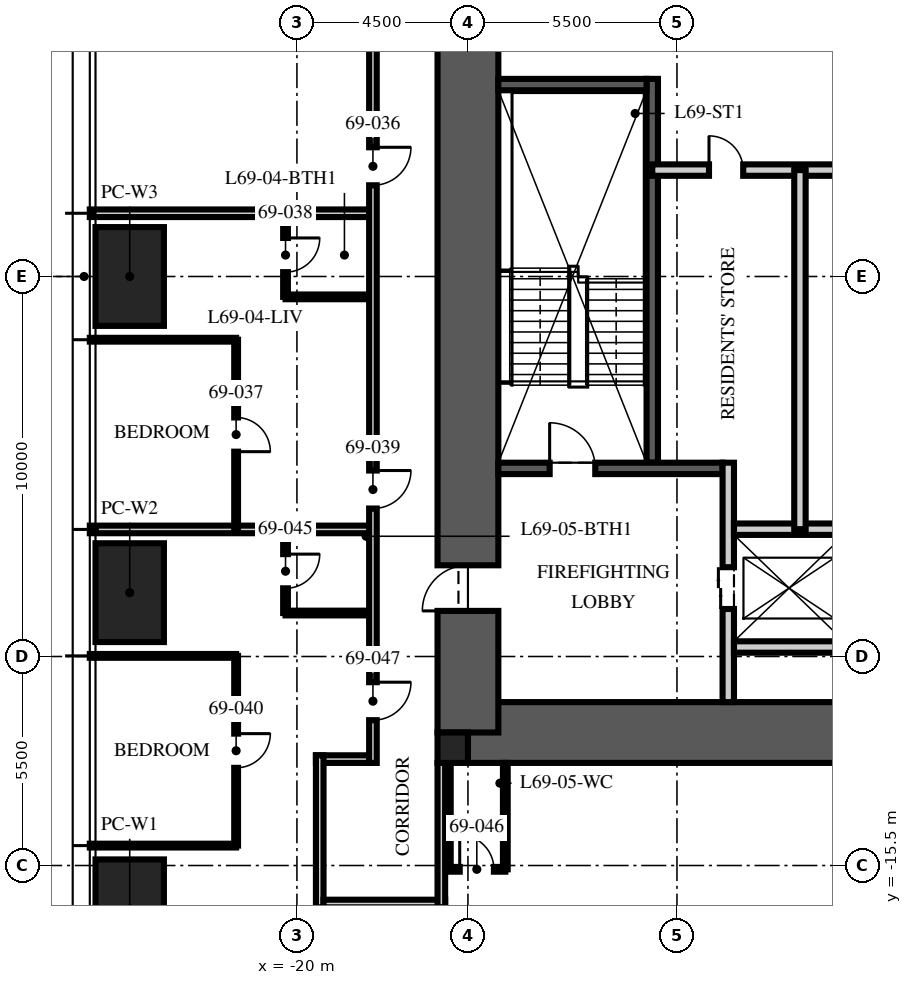
"""IFC4 building model, lengths in metres.
Left out: names, types, materials, properties, quantities, classifications, styles, units other than length and angle.
Written with IfcOpenShell. Run it as: python <this file> out.ifc"""

import sys

from ifc_helpers import new_model, si_unit, direction, frame, frame_2d, origin, origin_2d, place, context, subcontext, project, spatial, rectangle, hollow_rectangle, extrude, element, fill, save


model = new_model("IFC4")
c1 = context("Model", 3, precision=1e-05, world=origin(), true_north=direction((0.0, 1.0)))
c2 = subcontext(c1, "Body", "Model", "MODEL_VIEW")
j1 = project(units=[si_unit("LENGTHUNIT", "METRE"), si_unit("PLANEANGLEUNIT", "RADIAN")], contexts=[c1])
p1 = place(None, origin())
s1 = spatial("IfcSite", under=j1, at=p1, CompositionType="ELEMENT")
p2 = place(p1, origin())
s2 = spatial("IfcBuilding", under=s1, at=p2, CompositionType="ELEMENT")
p3 = place(p2, frame((0.0, 0.0, 274.5)))
s3 = spatial("IfcBuildingStorey", under=s2, at=p3, CompositionType="ELEMENT", Elevation=274.5)
p4 = place(p3, frame((-15.5, -12.0, -0.25), z_axis=(0.0, 0.0, 1.0), x_axis=(1.0, 0.0, 0.0)))
e1 = element("IfcWall", 1, at=p4, inside=s3, PredefinedType="SHEAR", context=c2, shape_type="SweptSolid", body=[
    extrude(rectangle(XDim=31.0, YDim=1.6, at=frame_2d((15.5, 0.0))), origin(), (0.0, 0.0, 1.0), 3.65),
])
p5 = place(p3, frame((-15.5, -12.0, -0.25), z_axis=(0.0, 0.0, 1.0), x_axis=(0.0, 1.0, 0.0)))
e2 = element("IfcWall", 2, at=p5, inside=s3, PredefinedType="SHEAR", context=c2, shape_type="SweptSolid", body=[
    extrude(rectangle(XDim=24.0, YDim=1.6, at=frame_2d((12.0, 0.0))), origin(), (0.0, 0.0, 1.0), 3.65),
])
p6 = place(p5, frame((3.2, 0.0, 0.25)))
e3 = element("IfcOpeningElement", 3, at=p6, cuts=e2, PredefinedType="OPENING", context=c2, shape_type="SweptSolid", body=[
    extrude(rectangle(XDim=1.2, YDim=2.1, at=frame_2d((0.6, 1.05))), frame((0.0, 0.81, 0.0), z_axis=(0.0, -1.0, 0.0), x_axis=(1.0, 0.0, 0.0)), (0.0, 0.0, 1.0), 1.62),
])
p7 = place(p5, frame((19.3, 0.0, 0.25)))
e4 = element("IfcOpeningElement", 4, at=p7, cuts=e2, PredefinedType="OPENING", context=c2, shape_type="SweptSolid", body=[
    extrude(rectangle(XDim=1.8, YDim=2.1, at=frame_2d((0.9, 1.05))), frame((0.0, 0.81, 0.0), z_axis=(0.0, -1.0, 0.0), x_axis=(1.0, 0.0, 0.0)), (0.0, 0.0, 1.0), 1.62),
])
p8 = place(p3, frame((-15.9, -12.4, -0.25), z_axis=(0.0, 0.0, 1.0), x_axis=(1.0, 0.0, 0.0)))
e5 = element("IfcColumn", 5, at=p8, inside=s3, PredefinedType="COLUMN", context=c2, shape_type="SweptSolid", body=[
    extrude(rectangle(XDim=0.8, YDim=0.8, at=origin_2d()), origin(), (0.0, 0.0, 1.0), 3.65),
])
p9 = place(p3, frame((-24.4, -16.64, 0.0), z_axis=(0.0, 0.0, 1.0), x_axis=(0.0, 1.0, 0.0)))
e6 = element("IfcColumn", 6, at=p9, inside=s3, PredefinedType="COLUMN", context=c2, shape_type="SweptSolid", body=[
    extrude(hollow_rectangle(XDim=2.6, YDim=1.8, WallThickness=0.14, at=origin_2d()), origin(), (0.0, 0.0, 1.0), 2.51),
])
p10 = place(p3, frame((-24.4, -8.32, 0.0), z_axis=(0.0, 0.0, 1.0), x_axis=(0.0, 1.0, 0.0)))
e7 = element("IfcColumn", 7, at=p10, inside=s3, PredefinedType="COLUMN", context=c2, shape_type="SweptSolid", body=[
    extrude(hollow_rectangle(XDim=2.6, YDim=1.8, WallThickness=0.14, at=origin_2d()), origin(), (0.0, 0.0, 1.0), 2.64),
])
p11 = place(p3, frame((-24.4, 0.0, 0.0), z_axis=(0.0, 0.0, 1.0), x_axis=(0.0, 1.0, 0.0)))
e8 = element("IfcColumn", 8, at=p11, inside=s3, PredefinedType="COLUMN", context=c2, shape_type="SweptSolid", body=[
    extrude(hollow_rectangle(XDim=2.6, YDim=1.8, WallThickness=0.14, at=origin_2d()), origin(), (0.0, 0.0, 1.0), 2.78),
])
p12 = place(p3, frame((-10.65, -4.9, 0.0), z_axis=(0.0, 0.0, 1.0), x_axis=(0.0, 1.0, 0.0)))
e9 = element("IfcWall", 9, at=p12, inside=s3, PredefinedType="SOLIDWALL", context=c2, shape_type="SweptSolid", body=[
    extrude(rectangle(XDim=10.1, YDim=0.3, at=frame_2d((5.05, 0.0))), origin(), (0.0, 0.0, 1.0), 3.4),
])
p13 = place(p3, frame((-14.7, -5.05, 0.0), z_axis=(0.0, 0.0, 1.0), x_axis=(1.0, 0.0, 0.0)))
e10 = element("IfcWall", 10, at=p13, inside=s3, PredefinedType="SOLIDWALL", context=c2, shape_type="SweptSolid", body=[
    extrude(rectangle(XDim=5.9, YDim=0.3, at=frame_2d((2.95, 0.0))), origin(), (0.0, 0.0, 1.0), 3.4),
])
p14 = place(p13, frame((1.35, 0.0, 0.0)))
e11 = element("IfcOpeningElement", 11, at=p14, cuts=e10, PredefinedType="OPENING", context=c2, shape_type="SweptSolid", body=[
    extrude(rectangle(XDim=1.2, YDim=2.1, at=frame_2d((0.6, 1.05))), frame((0.0, 0.16, 0.0), z_axis=(0.0, -1.0, 0.0), x_axis=(1.0, 0.0, 0.0)), (0.0, 0.0, 1.0), 0.32),
])
p15 = place(p3, frame((-14.7, 5.05, 0.0), z_axis=(0.0, 0.0, 1.0), x_axis=(1.0, 0.0, 0.0)))
e12 = element("IfcWall", 12, at=p15, inside=s3, PredefinedType="SOLIDWALL", context=c2, shape_type="SweptSolid", body=[
    extrude(rectangle(XDim=3.9, YDim=0.3, at=frame_2d((1.95, 0.0))), origin(), (0.0, 0.0, 1.0), 3.4),
])
p16 = place(p3, frame((-8.65, -11.2, 0.0), z_axis=(0.0, 0.0, 1.0), x_axis=(0.0, 1.0, 0.0)))
e13 = element("IfcWall", 13, at=p16, inside=s3, PredefinedType="PARTITIONING", context=c2, shape_type="SweptSolid", body=[
    extrude(rectangle(XDim=6.3, YDim=0.3, at=frame_2d((3.15, 0.0))), origin(), (0.0, 0.0, 1.0), 3.4),
])
p17 = place(p16, frame((2.45, 0.0, 0.0)))
e14 = element("IfcOpeningElement", 14, at=p17, cuts=e13, PredefinedType="OPENING", context=c2, shape_type="SweptSolid", body=[
    extrude(rectangle(XDim=1.1, YDim=2.1, at=frame_2d((0.55, 1.05))), frame((0.0, 0.16, 0.0), z_axis=(0.0, -1.0, 0.0), x_axis=(1.0, 0.0, 0.0)), (0.0, 0.0, 1.0), 0.32),
])
p18 = place(p3, frame((-8.5, -6.65, 0.0), z_axis=(0.0, 0.0, 1.0), x_axis=(1.0, 0.0, 0.0)))
e15 = element("IfcWall", 15, at=p18, inside=s3, PredefinedType="PARTITIONING", context=c2, shape_type="SweptSolid", body=[
    extrude(rectangle(XDim=17.0, YDim=0.3, at=frame_2d((8.5, 0.0))), origin(), (0.0, 0.0, 1.0), 3.4),
])
p19 = place(p18, frame((7.8, 0.0, 0.0)))
e16 = element("IfcOpeningElement", 16, at=p19, cuts=e15, PredefinedType="OPENING", context=c2, shape_type="SweptSolid", body=[
    extrude(rectangle(XDim=1.3, YDim=2.4, at=frame_2d((0.65, 1.2))), frame((0.0, 0.16, 0.0), z_axis=(0.0, -1.0, 0.0), x_axis=(1.0, 0.0, 0.0)), (0.0, 0.0, 1.0), 0.32),
])
p20 = place(p18, frame((5.65, 0.0, 0.0)))
e17 = element("IfcOpeningElement", 17, at=p20, cuts=e15, PredefinedType="OPENING", context=c2, shape_type="SweptSolid", body=[
    extrude(rectangle(XDim=0.9, YDim=2.1, at=frame_2d((0.45, 1.05))), frame((0.0, 0.16, 0.0), z_axis=(0.0, -1.0, 0.0), x_axis=(1.0, 0.0, 0.0)), (0.0, 0.0, 1.0), 0.32),
])
p21 = place(p18, frame((10.4, 0.0, 0.0)))
e18 = element("IfcOpeningElement", 18, at=p21, cuts=e15, PredefinedType="OPENING", context=c2, shape_type="SweptSolid", body=[
    extrude(rectangle(XDim=0.9, YDim=2.1, at=frame_2d((0.45, 1.05))), frame((0.0, 0.16, 0.0), z_axis=(0.0, -1.0, 0.0), x_axis=(1.0, 0.0, 0.0)), (0.0, 0.0, 1.0), 0.32),
])
p22 = place(p3, frame((-8.5, -9.75, 0.0), z_axis=(0.0, 0.0, 1.0), x_axis=(1.0, 0.0, 0.0)))
e19 = element("IfcWall", 19, at=p22, inside=s3, PredefinedType="PARTITIONING", context=c2, shape_type="SweptSolid", body=[
    extrude(rectangle(XDim=2.9, YDim=0.3, at=frame_2d((1.45, 0.0))), origin(), (0.0, 0.0, 1.0), 3.4),
])
p23 = place(p3, frame((-10.65, 2.8, 0.0), z_axis=(0.0, 0.0, 1.0), x_axis=(1.0, 0.0, 0.0)))
e20 = element("IfcWall", 20, at=p23, inside=s3, PredefinedType="PARTITIONING", context=c2, shape_type="SweptSolid", body=[
    extrude(rectangle(XDim=21.3, YDim=0.3, at=frame_2d((10.65, 0.0))), origin(), (0.0, 0.0, 1.0), 3.4),
])
p24 = place(p23, frame((10.05, 0.0, 0.0)))
e21 = element("IfcOpeningElement", 21, at=p24, cuts=e20, PredefinedType="OPENING", context=c2, shape_type="SweptSolid", body=[
    extrude(rectangle(XDim=1.2, YDim=2.1, at=frame_2d((0.6, 1.05))), frame((0.0, 0.16, 0.0), z_axis=(0.0, -1.0, 0.0), x_axis=(1.0, 0.0, 0.0)), (0.0, 0.0, 1.0), 0.32),
])
p25 = place(p23, frame((1.493, 0.0, 0.0)))
e22 = element("IfcOpeningElement", 22, at=p25, cuts=e20, PredefinedType="OPENING", context=c2, shape_type="SweptSolid", body=[
    extrude(rectangle(XDim=0.9, YDim=2.1, at=frame_2d((0.45, 1.05))), frame((0.0, 0.16, 0.0), z_axis=(0.0, -1.0, 0.0), x_axis=(1.0, 0.0, 0.0)), (0.0, 0.0, 1.0), 0.32),
])
p26 = place(p23, frame((18.836, 0.0, 0.0)))
e23 = element("IfcOpeningElement", 23, at=p26, cuts=e20, PredefinedType="OPENING", context=c2, shape_type="SweptSolid", body=[
    extrude(rectangle(XDim=0.9, YDim=2.1, at=frame_2d((0.45, 1.05))), frame((0.0, 0.16, 0.0), z_axis=(0.0, -1.0, 0.0), x_axis=(1.0, 0.0, 0.0)), (0.0, 0.0, 1.0), 0.32),
])
p27 = place(p3, frame((-6.764, -6.65, 0.0), z_axis=(0.0, 0.0, 1.0), x_axis=(0.0, 1.0, 0.0)))
e24 = element("IfcWall", 24, at=p27, inside=s3, PredefinedType="PARTITIONING", context=c2, shape_type="SweptSolid", body=[
    extrude(rectangle(XDim=9.45, YDim=0.3, at=frame_2d((4.725, 0.0))), origin(), (0.0, 0.0, 1.0), 3.4),
])
p28 = place(p3, frame((-18.1, -12.7, 0.0), z_axis=(0.0, 0.0, 1.0), x_axis=(-1.0, 0.0, 0.0)))
e25 = element("IfcWall", 25, at=p28, inside=s3, PredefinedType="PARTITIONING", context=c2, shape_type="SweptSolid", body=[
    extrude(rectangle(XDim=1.4, YDim=0.2, at=frame_2d((0.7, 0.0))), origin(), (0.0, 0.0, 1.0), 2.2),
])
p29 = place(p3, frame((-19.4, -12.6, 0.0), z_axis=(0.0, 0.0, 1.0), x_axis=(0.0, -1.0, 0.0)))
e26 = element("IfcWall", 26, at=p29, inside=s3, PredefinedType="PARTITIONING", context=c2, shape_type="SweptSolid", body=[
    extrude(rectangle(XDim=4.0, YDim=0.2, at=frame_2d((2.0, 0.0))), origin(), (0.0, 0.0, 1.0), 2.2),
])
p30 = place(p3, frame((-19.3, -16.5, 0.0), z_axis=(0.0, 0.0, 1.0), x_axis=(1.0, 0.0, 0.0)))
e27 = element("IfcWall", 27, at=p30, inside=s3, PredefinedType="PARTITIONING", context=c2, shape_type="SweptSolid", body=[
    extrude(rectangle(XDim=3.2, YDim=0.2, at=frame_2d((1.6, 0.0))), origin(), (0.0, 0.0, 1.0), 2.2),
])
p31 = place(p3, frame((-16.2, -16.6, 0.0), z_axis=(0.0, 0.0, 1.0), x_axis=(0.0, 1.0, 0.0)))
e28 = element("IfcWall", 28, at=p31, inside=s3, PredefinedType="PARTITIONING", context=c2, shape_type="SweptSolid", body=[
    extrude(rectangle(XDim=3.8, YDim=0.2, at=frame_2d((1.9, 0.0))), origin(), (0.0, 0.0, 1.0), 2.2),
])
p32 = place(p3, frame((-18.1, 1.664, 0.0), z_axis=(0.0, 0.0, 1.0), x_axis=(-1.0, 0.0, 0.0)))
e29 = element("IfcWall", 29, at=p32, inside=s3, PredefinedType="PARTITIONING", context=c2, shape_type="SweptSolid", body=[
    extrude(rectangle(XDim=7.35, YDim=0.2, at=frame_2d((3.675, 0.0))), origin(), (0.0, 0.0, 1.0), 2.75),
])
p33 = place(p3, frame((-21.6, -1.664, 0.0), z_axis=(0.0, 0.0, 1.0), x_axis=(-1.0, 0.0, 0.0)))
e30 = element("IfcWall", 30, at=p33, inside=s3, PredefinedType="PARTITIONING", context=c2, shape_type="SweptSolid", body=[
    extrude(rectangle(XDim=3.85, YDim=0.1, at=frame_2d((1.925, 0.0))), origin(), (0.0, 0.0, 1.0), 2.75),
])
p34 = place(p3, frame((-18.1, -6.656, 0.0), z_axis=(0.0, 0.0, 1.0), x_axis=(-1.0, 0.0, 0.0)))
e31 = element("IfcWall", 31, at=p34, inside=s3, PredefinedType="PARTITIONING", context=c2, shape_type="SweptSolid", body=[
    extrude(rectangle(XDim=7.35, YDim=0.2, at=frame_2d((3.675, 0.0))), origin(), (0.0, 0.0, 1.0), 2.75),
])
for number, where, z_axis, x_axis in (
    (32, (-21.6, -9.984, 0.0), (0.0, 0.0, 1.0), (-1.0, 0.0, 0.0)),
    (33, (-21.6, -14.976, 0.0), (0.0, 0.0, 1.0), (-1.0, 0.0, 0.0)),
):
    element("IfcWall", number, at=place(p3, frame(where, z_axis=z_axis, x_axis=x_axis)), inside=s3, PredefinedType="PARTITIONING", context=c2, shape_type="SweptSolid", body=[
        extrude(rectangle(XDim=3.85, YDim=0.1, at=frame_2d((1.925, 0.0))), origin(), (0.0, 0.0, 1.0), 2.75),
    ])
p35 = place(p3, frame((-21.6, -1.664, 0.0), z_axis=(0.0, 0.0, 1.0), x_axis=(0.0, -1.0, 0.0)))
e34 = element("IfcWall", 34, at=p35, inside=s3, PredefinedType="PARTITIONING", context=c2, shape_type="SweptSolid", body=[
    extrude(rectangle(XDim=4.992, YDim=0.1, at=frame_2d((2.496, 0.0))), origin(), (0.0, 0.0, 1.0), 2.2),
])
p36 = place(p35, frame((2.046, 0.0, 0.0)))
e35 = element("IfcOpeningElement", 35, at=p36, cuts=e34, PredefinedType="OPENING", context=c2, shape_type="SweptSolid", body=[
    extrude(rectangle(XDim=0.9, YDim=2.1, at=frame_2d((0.45, 1.05))), frame((0.0, 0.06, 0.0), z_axis=(0.0, -1.0, 0.0), x_axis=(1.0, 0.0, 0.0)), (0.0, 0.0, 1.0), 0.12),
])
p37 = place(p3, frame((-20.3, 1.664, 0.0), z_axis=(0.0, 0.0, 1.0), x_axis=(0.0, -1.0, 0.0)))
e36 = element("IfcWall", 36, at=p37, inside=s3, PredefinedType="PARTITIONING", context=c2, shape_type="SweptSolid", body=[
    extrude(rectangle(XDim=2.2, YDim=0.125, at=frame_2d((1.1, 0.0))), origin(), (0.0, 0.0, 1.0), 2.2),
])
p38 = place(p37, frame((0.65, 0.0, 0.0)))
e37 = element("IfcOpeningElement", 37, at=p38, cuts=e36, PredefinedType="OPENING", context=c2, shape_type="SweptSolid", body=[
    extrude(rectangle(XDim=0.9, YDim=2.1, at=frame_2d((0.45, 1.05))), frame((0.0, 0.073, 0.0), z_axis=(0.0, -1.0, 0.0), x_axis=(1.0, 0.0, 0.0)), (0.0, 0.0, 1.0), 0.145),
])
p39 = place(p3, frame((-18.1, -0.536, 0.0), z_axis=(0.0, 0.0, 1.0), x_axis=(-1.0, 0.0, 0.0)))
e38 = element("IfcWall", 38, at=p39, inside=s3, PredefinedType="PARTITIONING", context=c2, shape_type="SweptSolid", body=[
    extrude(rectangle(XDim=2.2, YDim=0.125, at=frame_2d((1.1, 0.0))), origin(), (0.0, 0.0, 1.0), 2.2),
])
p40 = place(p3, frame((-21.6, -9.984, 0.0), z_axis=(0.0, 0.0, 1.0), x_axis=(0.0, -1.0, 0.0)))
e39 = element("IfcWall", 39, at=p40, inside=s3, PredefinedType="PARTITIONING", context=c2, shape_type="SweptSolid", body=[
    extrude(rectangle(XDim=4.992, YDim=0.1, at=frame_2d((2.496, 0.0))), origin(), (0.0, 0.0, 1.0), 2.2),
])
p41 = place(p40, frame((2.046, 0.0, 0.0)))
e40 = element("IfcOpeningElement", 40, at=p41, cuts=e39, PredefinedType="OPENING", context=c2, shape_type="SweptSolid", body=[
    extrude(rectangle(XDim=0.9, YDim=2.1, at=frame_2d((0.45, 1.05))), frame((0.0, 0.06, 0.0), z_axis=(0.0, -1.0, 0.0), x_axis=(1.0, 0.0, 0.0)), (0.0, 0.0, 1.0), 0.12),
])
p42 = place(p3, frame((-20.3, -6.656, 0.0), z_axis=(0.0, 0.0, 1.0), x_axis=(0.0, -1.0, 0.0)))
e41 = element("IfcWall", 41, at=p42, inside=s3, PredefinedType="PARTITIONING", context=c2, shape_type="SweptSolid", body=[
    extrude(rectangle(XDim=2.2, YDim=0.125, at=frame_2d((1.1, 0.0))), origin(), (0.0, 0.0, 1.0), 2.2),
])
p43 = place(p42, frame((0.65, 0.0, 0.0)))
e42 = element("IfcOpeningElement", 42, at=p43, cuts=e41, PredefinedType="OPENING", context=c2, shape_type="SweptSolid", body=[
    extrude(rectangle(XDim=0.9, YDim=2.1, at=frame_2d((0.45, 1.05))), frame((0.0, 0.073, 0.0), z_axis=(0.0, -1.0, 0.0), x_axis=(1.0, 0.0, 0.0)), (0.0, 0.0, 1.0), 0.145),
])
p44 = place(p3, frame((-18.1, -8.856, 0.0), z_axis=(0.0, 0.0, 1.0), x_axis=(-1.0, 0.0, 0.0)))
e43 = element("IfcWall", 43, at=p44, inside=s3, PredefinedType="PARTITIONING", context=c2, shape_type="SweptSolid", body=[
    extrude(rectangle(XDim=2.2, YDim=0.125, at=frame_2d((1.1, 0.0))), origin(), (0.0, 0.0, 1.0), 2.4),
])
p45 = place(p3, frame((-16.017, -15.6, 0.0), z_axis=(0.0, 0.0, 1.0), x_axis=(1.0, 0.0, 0.0)))
e44 = element("IfcWall", 44, at=p45, inside=s3, PredefinedType="PARTITIONING", context=c2, shape_type="SweptSolid", body=[
    extrude(rectangle(XDim=1.5, YDim=0.125, at=frame_2d((0.75, 0.0))), origin(), (0.0, 0.0, 1.0), 3.4),
])
p46 = place(p45, frame((0.3, 0.0, 0.0)))
e45 = element("IfcOpeningElement", 45, at=p46, cuts=e44, PredefinedType="OPENING", context=c2, shape_type="SweptSolid", body=[
    extrude(rectangle(XDim=0.9, YDim=2.1, at=frame_2d((0.45, 1.05))), frame((0.0, 0.073, 0.0), z_axis=(0.0, -1.0, 0.0), x_axis=(1.0, 0.0, 0.0)), (0.0, 0.0, 1.0), 0.145),
])
p47 = place(p3, frame((-16.017, -12.8, 0.0), z_axis=(0.0, 0.0, 1.0), x_axis=(0.0, -1.0, 0.0)))
e46 = element("IfcWall", 46, at=p47, inside=s3, PredefinedType="PARTITIONING", context=c2, shape_type="SweptSolid", body=[
    extrude(rectangle(XDim=2.8, YDim=0.125, at=frame_2d((1.4, 0.0))), origin(), (0.0, 0.0, 1.0), 2.2),
])
p48 = place(p3, frame((-14.517, -12.8, 0.0), z_axis=(0.0, 0.0, 1.0), x_axis=(0.0, -1.0, 0.0)))
e47 = element("IfcWall", 47, at=p48, inside=s3, PredefinedType="PARTITIONING", context=c2, shape_type="SweptSolid", body=[
    extrude(rectangle(XDim=2.8, YDim=0.125, at=frame_2d((1.4, 0.0))), origin(), (0.0, 0.0, 1.0), 3.4),
])
p49 = place(p3, frame((-18.0, 13.0, 0.0), z_axis=(0.0, 0.0, 1.0), x_axis=(0.0, -1.0, 0.0)))
e48 = element("IfcWall", 48, at=p49, inside=s3, PredefinedType="PARTITIONING", context=c2, shape_type="SweptSolid", body=[
    extrude(rectangle(XDim=25.8, YDim=0.2, at=frame_2d((12.9, 0.0))), origin(), (0.0, 0.0, 1.0), 2.2),
])
p50 = place(p49, frame((9.6, 0.0, 0.0)))
e49 = element("IfcOpeningElement", 49, at=p50, cuts=e48, PredefinedType="OPENING", context=c2, shape_type="SweptSolid", body=[
    extrude(rectangle(XDim=1.0, YDim=2.2, at=frame_2d((0.5, 1.1))), frame((0.0, 0.11, 0.0), z_axis=(0.0, -1.0, 0.0), x_axis=(1.0, 0.0, 0.0)), (0.0, 0.0, 1.0), 0.22),
])
p51 = place(p49, frame((18.106, 0.0, 0.0)))
e50 = element("IfcOpeningElement", 50, at=p51, cuts=e48, PredefinedType="OPENING", context=c2, shape_type="SweptSolid", body=[
    extrude(rectangle(XDim=1.0, YDim=2.2, at=frame_2d((0.5, 1.1))), frame((0.0, 0.11, 0.0), z_axis=(0.0, -1.0, 0.0), x_axis=(1.0, 0.0, 0.0)), (0.0, 0.0, 1.0), 0.22),
])
p52 = place(p49, frame((23.676, 0.0, 0.0)))
e51 = element("IfcOpeningElement", 51, at=p52, cuts=e48, PredefinedType="OPENING", context=c2, shape_type="SweptSolid", body=[
    extrude(rectangle(XDim=1.0, YDim=2.2, at=frame_2d((0.5, 1.1))), frame((0.0, 0.11, 0.0), z_axis=(0.0, -1.0, 0.0), x_axis=(1.0, 0.0, 0.0)), (0.0, 0.0, 1.0), 0.22),
])
p53 = place(p14, origin())
e52 = element("IfcDoor", 52, at=p53, inside=s3, OperationType="SINGLE_SWING_LEFT", PredefinedType="DOOR", context=c2, shape_type="SweptSolid", body=[
    extrude(rectangle(XDim=1.2, YDim=2.1, at=frame_2d((0.6, 1.05))), frame((0.0, 0.025, 0.0), z_axis=(0.0, -1.0, 0.0), x_axis=(1.0, 0.0, 0.0)), (0.0, 0.0, 1.0), 0.05),
])
fill(e11, e52)
p54 = place(p6, origin())
e53 = element("IfcDoor", 53, at=p54, inside=s3, OperationType="SINGLE_SWING_LEFT", PredefinedType="DOOR", context=c2, shape_type="SweptSolid", body=[
    extrude(rectangle(XDim=1.2, YDim=2.1, at=frame_2d((0.6, 1.05))), frame((0.0, 0.025, 0.0), z_axis=(0.0, -1.0, 0.0), x_axis=(1.0, 0.0, 0.0)), (0.0, 0.0, 1.0), 0.05),
])
fill(e3, e53)
p55 = place(p17, origin())
e54 = element("IfcDoor", 54, at=p55, inside=s3, OperationType="DOUBLE_DOOR_SLIDING", PredefinedType="DOOR", context=c2, shape_type="SweptSolid", body=[
    extrude(rectangle(XDim=1.1, YDim=2.1, at=frame_2d((0.55, 1.05))), frame((0.0, 0.025, 0.0), z_axis=(0.0, -1.0, 0.0), x_axis=(1.0, 0.0, 0.0)), (0.0, 0.0, 1.0), 0.05),
])
fill(e14, e54)
p56 = place(p25, origin())
e55 = element("IfcDoor", 55, at=p56, inside=s3, OperationType="SINGLE_SWING_LEFT", PredefinedType="DOOR", context=c2, shape_type="SweptSolid", body=[
    extrude(rectangle(XDim=0.9, YDim=2.1, at=frame_2d((0.45, 1.05))), frame((0.0, 0.025, 0.0), z_axis=(0.0, -1.0, 0.0), x_axis=(1.0, 0.0, 0.0)), (0.0, 0.0, 1.0), 0.05),
])
fill(e22, e55)
p57 = place(p50, origin())
e56 = element("IfcDoor", 56, at=p57, inside=s3, OperationType="SINGLE_SWING_LEFT", PredefinedType="DOOR", context=c2, shape_type="SweptSolid", body=[
    extrude(rectangle(XDim=1.0, YDim=2.2, at=frame_2d((0.5, 1.1))), frame((0.0, 0.025, 0.0), z_axis=(0.0, -1.0, 0.0), x_axis=(1.0, 0.0, 0.0)), (0.0, 0.0, 1.0), 0.05),
])
fill(e49, e56)
p58 = place(p36, origin())
e57 = element("IfcDoor", 57, at=p58, inside=s3, OperationType="SINGLE_SWING_RIGHT", PredefinedType="DOOR", context=c2, shape_type="SweptSolid", body=[
    extrude(rectangle(XDim=0.9, YDim=2.1, at=frame_2d((0.45, 1.05))), frame((0.0, 0.025, 0.0), z_axis=(0.0, -1.0, 0.0), x_axis=(1.0, 0.0, 0.0)), (0.0, 0.0, 1.0), 0.05),
])
fill(e35, e57)
p59 = place(p38, origin())
e58 = element("IfcDoor", 58, at=p59, inside=s3, OperationType="SINGLE_SWING_LEFT", PredefinedType="DOOR", context=c2, shape_type="SweptSolid", body=[
    extrude(rectangle(XDim=0.9, YDim=2.1, at=frame_2d((0.45, 1.05))), frame((0.0, 0.025, 0.0), z_axis=(0.0, -1.0, 0.0), x_axis=(1.0, 0.0, 0.0)), (0.0, 0.0, 1.0), 0.05),
])
fill(e37, e58)
p60 = place(p51, origin())
e59 = element("IfcDoor", 59, at=p60, inside=s3, OperationType="SINGLE_SWING_LEFT", PredefinedType="DOOR", context=c2, shape_type="SweptSolid", body=[
    extrude(rectangle(XDim=1.0, YDim=2.2, at=frame_2d((0.5, 1.1))), frame((0.0, 0.025, 0.0), z_axis=(0.0, -1.0, 0.0), x_axis=(1.0, 0.0, 0.0)), (0.0, 0.0, 1.0), 0.05),
])
fill(e50, e59)
p61 = place(p41, origin())
e60 = element("IfcDoor", 60, at=p61, inside=s3, OperationType="SINGLE_SWING_LEFT", PredefinedType="DOOR", context=c2, shape_type="SweptSolid", body=[
    extrude(rectangle(XDim=0.9, YDim=2.1, at=frame_2d((0.45, 1.05))), frame((0.0, 0.025, 0.0), z_axis=(0.0, -1.0, 0.0), x_axis=(1.0, 0.0, 0.0)), (0.0, 0.0, 1.0), 0.05),
])
fill(e40, e60)
p62 = place(p43, origin())
e61 = element("IfcDoor", 61, at=p62, inside=s3, OperationType="SINGLE_SWING_LEFT", PredefinedType="DOOR", context=c2, shape_type="SweptSolid", body=[
    extrude(rectangle(XDim=0.9, YDim=2.1, at=frame_2d((0.45, 1.05))), frame((0.0, 0.025, 0.0), z_axis=(0.0, -1.0, 0.0), x_axis=(1.0, 0.0, 0.0)), (0.0, 0.0, 1.0), 0.05),
])
fill(e42, e61)
p63 = place(p46, origin())
e62 = element("IfcDoor", 62, at=p63, inside=s3, OperationType="SINGLE_SWING_LEFT", PredefinedType="DOOR", context=c2, shape_type="SweptSolid", body=[
    extrude(rectangle(XDim=0.9, YDim=2.1, at=frame_2d((0.45, 1.05))), frame((0.0, 0.025, 0.0), z_axis=(0.0, -1.0, 0.0), x_axis=(1.0, 0.0, 0.0)), (0.0, 0.0, 1.0), 0.05),
])
fill(e45, e62)
p64 = place(p52, origin())
e63 = element("IfcDoor", 63, at=p64, inside=s3, OperationType="SINGLE_SWING_LEFT", PredefinedType="DOOR", context=c2, shape_type="SweptSolid", body=[
    extrude(rectangle(XDim=1.0, YDim=2.2, at=frame_2d((0.5, 1.1))), frame((0.0, 0.025, 0.0), z_axis=(0.0, -1.0, 0.0), x_axis=(1.0, 0.0, 0.0)), (0.0, 0.0, 1.0), 0.05),
])
fill(e51, e63)
save(model, sys.argv[1])
